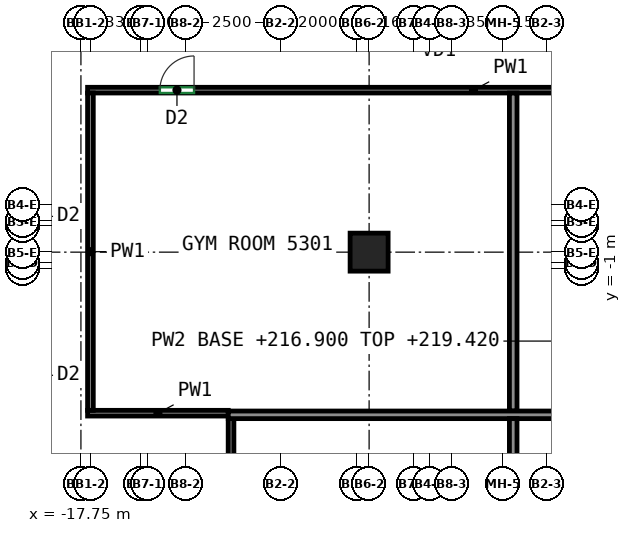
"""IFC4 building model, lengths in metres.
Left out: names, types, materials, properties, quantities, classifications, styles, units other than length and angle.
Written with IfcOpenShell. Run it as: python <this file> out.ifc"""

import sys

from ifc_helpers import new_model, si_unit, direction, frame, frame_2d, origin, origin_2d, place, context, subcontext, project, spatial, rectangle, extrude, source, transform, mapped, element, fill, save


model = new_model("IFC4")
c1 = context("Model", 3, precision=1e-05, world=origin(), true_north=direction((0.0, 1.0)))
c2 = subcontext(c1, "Body", "Model", "MODEL_VIEW")
j1 = project(units=[si_unit("LENGTHUNIT", "METRE"), si_unit("PLANEANGLEUNIT", "RADIAN")], contexts=[c1])
p1 = place(None, origin())
s1 = spatial("IfcSite", under=j1, at=p1, CompositionType="ELEMENT")
p2 = place(p1, origin())
s2 = spatial("IfcBuilding", under=s1, at=p2, CompositionType="ELEMENT")
p3 = place(p2, frame((0.0, 0.0, 216.9)))
s3 = spatial("IfcBuildingStorey", under=s2, at=p3, CompositionType="ELEMENT", Elevation=216.9)
m1 = source(origin(), c2, "Body", "SweptSolid", [
    extrude(rectangle(XDim=1.0, YDim=1.0, at=origin_2d()), origin(), (0.0, 0.0, 1.0), 3.12),
])
p4 = place(p3, frame((-10.167, -0.562, 0.0), z_axis=(0.0, 0.0, 1.0), x_axis=(1.0, 0.0, 0.0)))
e1 = element("IfcColumn", 1, at=p4, inside=s3, PredefinedType="COLUMN", context=c2, shape_type="MappedRepresentation", body=[
    mapped(m1, transform((0.0, 0.0, 0.0))),
])
p5 = place(p3, frame((-17.575, -4.8, 0.0), z_axis=(0.0, 0.0, 1.0), x_axis=(1.0, 0.0, 0.0)))
e2 = element("IfcWall", 2, at=p5, inside=s3, PredefinedType="PARTITIONING", context=c2, shape_type="SweptSolid", body=[
    extrude(rectangle(XDim=3.702, YDim=0.15, at=frame_2d((1.851, 0.0))), origin(), (0.0, 0.0, 1.0), 3.12),
])
p6 = place(p3, frame((-17.575, 3.7, 0.0), z_axis=(0.0, 0.0, 1.0), x_axis=(1.0, 0.0, 0.0)))
e3 = element("IfcWall", 3, at=p6, inside=s3, PredefinedType="PARTITIONING", context=c2, shape_type="SweptSolid", body=[
    extrude(rectangle(XDim=33.85, YDim=0.15, at=frame_2d((16.925, 0.0))), origin(), (0.0, 0.0, 1.0), 3.12),
])
p7 = place(p6, frame((1.902, 0.0, 0.0)))
e4 = element("IfcOpeningElement", 4, at=p7, cuts=e3, PredefinedType="OPENING", context=c2, shape_type="SweptSolid", body=[
    extrude(rectangle(XDim=0.9, YDim=2.1, at=frame_2d((0.45, 1.05))), frame((0.0, 0.085, 0.0), z_axis=(0.0, -1.0, 0.0), x_axis=(1.0, 0.0, 0.0)), (0.0, 0.0, 1.0), 0.17),
])
p8 = place(p6, frame((15.841, 0.0, 0.0)))
e5 = element("IfcOpeningElement", 5, at=p8, cuts=e3, PredefinedType="OPENING", context=c2, shape_type="SweptSolid", body=[
    extrude(rectangle(XDim=0.9, YDim=2.1, at=frame_2d((0.45, 1.05))), frame((0.0, 0.085, 0.0), z_axis=(0.0, -1.0, 0.0), x_axis=(1.0, 0.0, 0.0)), (0.0, 0.0, 1.0), 0.17),
])
p9 = place(p6, frame((20.724, 0.0, 0.0)))
e6 = element("IfcOpeningElement", 6, at=p9, cuts=e3, PredefinedType="OPENING", context=c2, shape_type="SweptSolid", body=[
    extrude(rectangle(XDim=0.9, YDim=2.1, at=frame_2d((0.45, 1.05))), frame((0.0, 0.085, 0.0), z_axis=(0.0, -1.0, 0.0), x_axis=(1.0, 0.0, 0.0)), (0.0, 0.0, 1.0), 0.17),
])
p10 = place(p6, frame((27.46, 0.0, 0.0)))
e7 = element("IfcOpeningElement", 7, at=p10, cuts=e3, PredefinedType="OPENING", context=c2, shape_type="SweptSolid", body=[
    extrude(rectangle(XDim=0.9, YDim=2.1, at=frame_2d((0.45, 1.05))), frame((0.0, 0.085, 0.0), z_axis=(0.0, -1.0, 0.0), x_axis=(1.0, 0.0, 0.0)), (0.0, 0.0, 1.0), 0.17),
])
p11 = place(p3, frame((-17.5, -4.725, 0.0), z_axis=(0.0, 0.0, 1.0), x_axis=(0.0, 1.0, 0.0)))
e8 = element("IfcWall", 8, at=p11, inside=s3, PredefinedType="PARTITIONING", context=c2, shape_type="SweptSolid", body=[
    extrude(rectangle(XDim=8.35, YDim=0.15, at=frame_2d((4.175, 0.0))), origin(), (0.0, 0.0, 1.0), 3.12),
])
p12 = place(p3, frame((-13.8, -7.75, 0.0), z_axis=(0.0, 0.0, 1.0), x_axis=(0.0, 1.0, 0.0)))
e9 = element("IfcWall", 9, at=p12, inside=s3, PredefinedType="PARTITIONING", context=c2, shape_type="SweptSolid", body=[
    extrude(rectangle(XDim=2.817, YDim=0.15, at=frame_2d((1.408, 0.0))), origin(), (0.0, 0.0, 1.0), 3.12),
])
p13 = place(p3, frame((-6.375, -4.743, 0.0), z_axis=(0.0, 0.0, 1.0), x_axis=(0.0, 1.0, 0.0)))
e10 = element("IfcWall", 10, at=p13, inside=s3, PredefinedType="PARTITIONING", context=c2, shape_type="SweptSolid", body=[
    extrude(rectangle(XDim=8.366, YDim=0.2, at=frame_2d((4.183, 0.0))), origin(), (0.0, 0.0, 1.0), 3.12),
])
p14 = place(p3, frame((-13.873, -4.843, 0.0), z_axis=(0.0, 0.0, 1.0), x_axis=(1.0, 0.0, 0.0)))
e11 = element("IfcWall", 11, at=p14, inside=s3, PredefinedType="PARTITIONING", context=c2, shape_type="SweptSolid", body=[
    extrude(rectangle(XDim=30.146, YDim=0.2, at=frame_2d((15.073, 0.0))), origin(), (0.0, 0.0, 1.0), 3.12),
])
p15 = place(p3, frame((-6.375, -15.423, 0.0), z_axis=(0.0, 0.0, 1.0), x_axis=(0.0, 1.0, 0.0)))
e12 = element("IfcWall", 12, at=p15, inside=s3, PredefinedType="PARTITIONING", context=c2, shape_type="SweptSolid", body=[
    extrude(rectangle(XDim=10.48, YDim=0.2, at=frame_2d((5.24, 0.0))), origin(), (0.0, 0.0, 1.0), 3.12),
])
p16 = place(p7, origin())
e13 = element("IfcDoor", 13, at=p16, inside=s3, OperationType="SINGLE_SWING_RIGHT", PredefinedType="DOOR", context=c2, shape_type="SweptSolid", body=[
    extrude(rectangle(XDim=0.9, YDim=2.1, at=frame_2d((0.45, 1.05))), frame((0.0, 0.025, 0.0), z_axis=(0.0, -1.0, 0.0), x_axis=(1.0, 0.0, 0.0)), (0.0, 0.0, 1.0), 0.05),
])
fill(e4, e13)
save(model, sys.argv[1])
